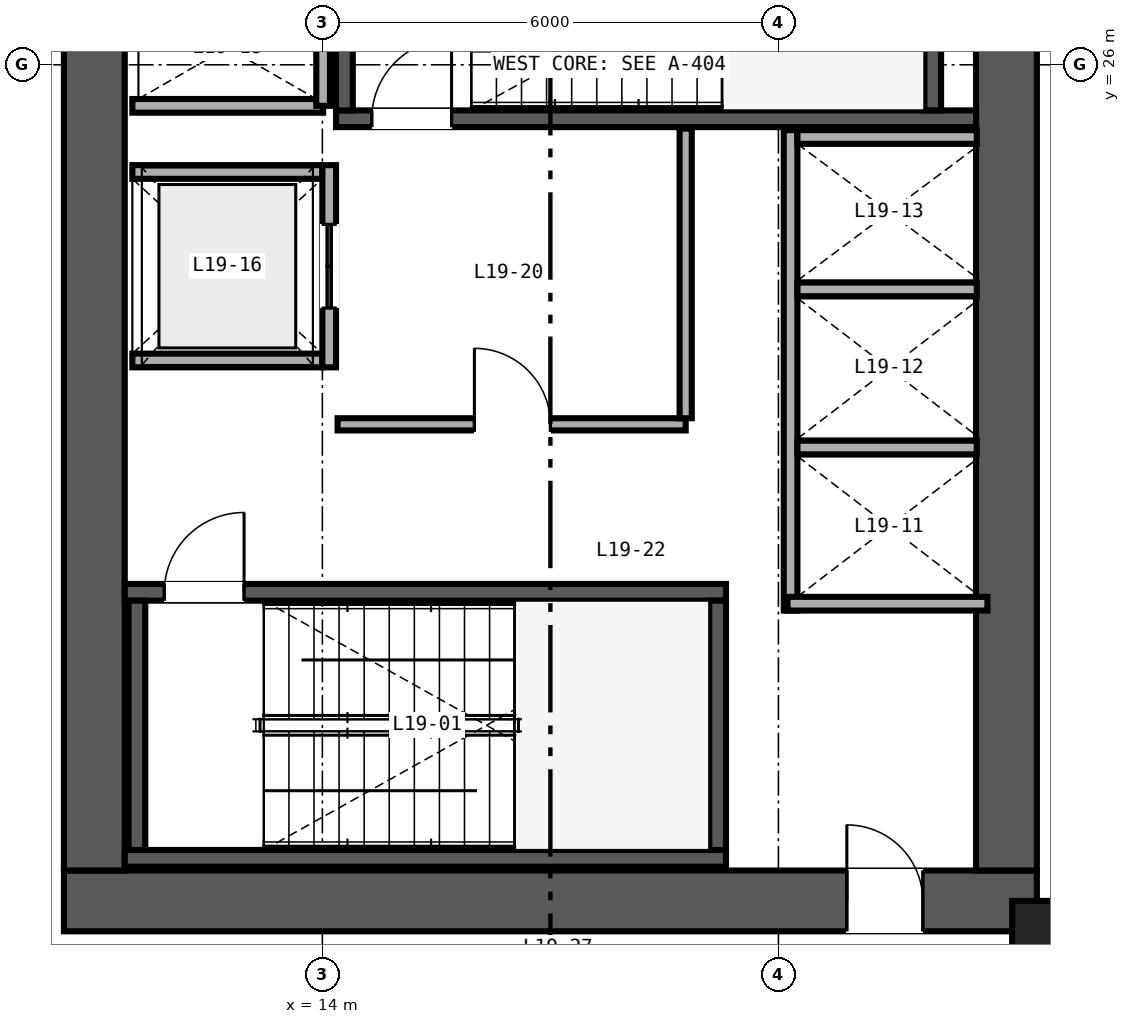
"""IFC4 building model, lengths in metres.
Left out: names, types, materials, properties, quantities, classifications, styles, units other than length and angle.
Written with IfcOpenShell. Run it as: python <this file> out.ifc"""

import sys

from ifc_helpers import new_model, si_unit, direction, frame, frame_2d, origin, origin_2d, place, context, subcontext, project, spatial, rectangle, hollow_rectangle, extrude, source, transform, mapped, element, fill, save


model = new_model("IFC4")
c1 = context("Model", 3, precision=1e-05, world=origin(), true_north=direction((0.0, 1.0)))
c2 = subcontext(c1, "Body", "Model", "MODEL_VIEW")
j1 = project(units=[si_unit("LENGTHUNIT", "METRE"), si_unit("PLANEANGLEUNIT", "RADIAN")], contexts=[c1])
p1 = place(None, origin())
s1 = spatial("IfcSite", under=j1, at=p1, CompositionType="ELEMENT")
p2 = place(p1, origin())
s2 = spatial("IfcBuilding", under=s1, at=p2, CompositionType="ELEMENT")
p3 = place(p2, frame((0.0, 0.0, 78.0)))
s3 = spatial("IfcBuildingStorey", under=s2, at=p3, CompositionType="ELEMENT", Elevation=78.0)
p4 = place(p3, frame((10.6, 15.0, 0.0), z_axis=(0.0, 0.0, 1.0), x_axis=(1.0, 0.0, 0.0)))
e1 = element("IfcWall", 1, at=p4, inside=s3, PredefinedType="SHEAR", context=c2, shape_type="SweptSolid", body=[
    extrude(rectangle(XDim=12.8, YDim=0.8, at=frame_2d((6.4, 0.0))), origin(), (0.0, 0.0, 1.0), 3.35),
])
p5 = place(p4, frame((10.3, 0.0, 0.0)))
e2 = element("IfcOpeningElement", 2, at=p5, cuts=e1, PredefinedType="OPENING", context=c2, shape_type="SweptSolid", body=[
    extrude(rectangle(XDim=1.0, YDim=2.15, at=frame_2d((0.5, 1.075))), frame((0.0, 0.41, 0.0), z_axis=(0.0, -1.0, 0.0), x_axis=(1.0, 0.0, 0.0)), (0.0, 0.0, 1.0), 0.82),
])
for number, where, z_axis, x_axis in (
    (3, (11.0, 15.4, 0.0), (0.0, 0.0, 1.0), (0.0, 1.0, 0.0)),
    (4, (23.0, 15.4, 0.0), (0.0, 0.0, 1.0), (0.0, 1.0, 0.0)),
):
    element("IfcWall", number, at=place(p3, frame(where, z_axis=z_axis, x_axis=x_axis)), inside=s3, PredefinedType="SHEAR", context=c2, shape_type="SweptSolid", body=[
        extrude(rectangle(XDim=21.2, YDim=0.8, at=frame_2d((10.6, 0.0))), origin(), (0.0, 0.0, 1.0), 3.35),
    ])
p6 = place(p3, frame((11.4, 15.56, 0.0), z_axis=(0.0, 0.0, 1.0), x_axis=(1.0, 0.0, 0.0)))
e5 = element("IfcWall", 5, at=p6, inside=s3, PredefinedType="SHEAR", context=c2, shape_type="SweptSolid", body=[
    extrude(rectangle(XDim=7.91, YDim=0.22, at=frame_2d((3.955, 0.0))), origin(), (0.0, 0.0, 1.0), 3.4),
])
p7 = place(p3, frame((11.4, 19.06, 0.0), z_axis=(0.0, 0.0, 1.0), x_axis=(1.0, 0.0, 0.0)))
e6 = element("IfcWall", 6, at=p7, inside=s3, PredefinedType="SHEAR", context=c2, shape_type="SweptSolid", body=[
    extrude(rectangle(XDim=7.91, YDim=0.22, at=frame_2d((3.955, 0.0))), origin(), (0.0, 0.0, 1.0), 3.4),
])
p8 = place(p7, frame((0.52, 0.0, 0.0)))
e7 = element("IfcOpeningElement", 7, at=p8, cuts=e6, PredefinedType="OPENING", context=c2, shape_type="SweptSolid", body=[
    extrude(rectangle(XDim=1.05, YDim=2.15, at=frame_2d((0.525, 1.075))), frame((0.0, 0.12, 0.0), z_axis=(0.0, -1.0, 0.0), x_axis=(1.0, 0.0, 0.0)), (0.0, 0.0, 1.0), 0.24),
])
for number, where, z_axis, x_axis in (
    (8, (11.56, 15.67, 0.0), (0.0, 0.0, 1.0), (0.0, 1.0, 0.0)),
    (9, (19.2, 15.67, 0.0), (0.0, 0.0, 1.0), (0.0, 1.0, 0.0)),
):
    element("IfcWall", number, at=place(p3, frame(where, z_axis=z_axis, x_axis=x_axis)), inside=s3, PredefinedType="SHEAR", context=c2, shape_type="SweptSolid", body=[
        extrude(rectangle(XDim=3.28, YDim=0.22, at=frame_2d((1.64, 0.0))), origin(), (0.0, 0.0, 1.0), 3.4),
    ])
p9 = place(p3, frame((14.18, 25.29, 0.0), z_axis=(0.0, 0.0, 1.0), x_axis=(1.0, 0.0, 0.0)))
e10 = element("IfcWall", 10, at=p9, inside=s3, PredefinedType="SHEAR", context=c2, shape_type="SweptSolid", body=[
    extrude(rectangle(XDim=8.42, YDim=0.22, at=frame_2d((4.21, 0.0))), origin(), (0.0, 0.0, 1.0), 3.4),
])
p10 = place(p9, frame((0.47, 0.0, 0.0)))
e11 = element("IfcOpeningElement", 11, at=p10, cuts=e10, PredefinedType="OPENING", context=c2, shape_type="SweptSolid", body=[
    extrude(rectangle(XDim=1.05, YDim=2.15, at=frame_2d((0.525, 1.075))), frame((0.0, 0.12, 0.0), z_axis=(0.0, -1.0, 0.0), x_axis=(1.0, 0.0, 0.0)), (0.0, 0.0, 1.0), 0.24),
])
for number, where, z_axis, x_axis in (
    (12, (14.29, 25.4, 0.0), (0.0, 0.0, 1.0), (0.0, 1.0, 0.0)),
    (13, (22.03, 25.4, 0.0), (0.0, 0.0, 1.0), (0.0, 1.0, 0.0)),
):
    element("IfcWall", number, at=place(p3, frame(where, z_axis=z_axis, x_axis=x_axis)), inside=s3, PredefinedType="SHEAR", context=c2, shape_type="SweptSolid", body=[
        extrude(rectangle(XDim=3.28, YDim=0.22, at=frame_2d((1.64, 0.0))), origin(), (0.0, 0.0, 1.0), 3.4),
    ])
m1 = source(origin(), c2, "Body", "SweptSolid", [
    extrude(hollow_rectangle(XDim=0.85, YDim=0.9, WallThickness=0.04, at=origin_2d()), origin(), (0.0, 0.0, 1.0), 3.35),
])
p11 = place(p3, frame((23.5, 14.55, 0.0), z_axis=(0.0, 0.0, 1.0), x_axis=(1.0, 0.0, 0.0)))
e14 = element("IfcColumn", 14, at=p11, inside=s3, PredefinedType="COLUMN", context=c2, shape_type="MappedRepresentation", body=[
    mapped(m1, transform((0.0, 0.0, 0.0), scale=1.0)),
])
p12 = place(p3, frame((20.16, 18.82, 0.0), z_axis=(0.0, 0.0, 1.0), x_axis=(0.0, 1.0, 0.0)))
e15 = element("IfcWall", 15, at=p12, inside=s3, PredefinedType="SOLIDWALL", context=c2, shape_type="SweptSolid", body=[
    extrude(rectangle(XDim=6.32, YDim=0.18, at=frame_2d((3.16, 0.0))), origin(), (0.0, 0.0, 1.0), 2.36),
])
p13 = place(p3, frame((20.12, 18.91, 0.0), z_axis=(0.0, 0.0, 1.0), x_axis=(1.0, 0.0, 0.0)))
e16 = element("IfcWall", 16, at=p13, inside=s3, PredefinedType="SOLIDWALL", context=c2, shape_type="SweptSolid", body=[
    extrude(rectangle(XDim=2.63, YDim=0.18, at=frame_2d((1.315, 0.0))), origin(), (0.0, 0.0, 1.0), 3.35),
])
p14 = place(p3, frame((20.25, 25.05, 0.0), z_axis=(0.0, 0.0, 1.0), x_axis=(1.0, 0.0, 0.0)))
e17 = element("IfcWall", 17, at=p14, inside=s3, PredefinedType="SOLIDWALL", context=c2, shape_type="SweptSolid", body=[
    extrude(rectangle(XDim=2.36, YDim=0.18, at=frame_2d((1.18, 0.0))), origin(), (0.0, 0.0, 1.0), 3.35),
])
p15 = place(p3, frame((20.25, 20.965, 0.0), z_axis=(0.0, 0.0, 1.0), x_axis=(1.0, 0.0, 0.0)))
e18 = element("IfcWall", 18, at=p15, inside=s3, PredefinedType="SOLIDWALL", context=c2, shape_type="SweptSolid", body=[
    extrude(rectangle(XDim=2.36, YDim=0.18, at=frame_2d((1.18, 0.0))), origin(), (0.0, 0.0, 1.0), 2.36),
])
p16 = place(p3, frame((20.25, 23.045, 0.0), z_axis=(0.0, 0.0, 1.0), x_axis=(1.0, 0.0, 0.0)))
e19 = element("IfcWall", 19, at=p16, inside=s3, PredefinedType="SOLIDWALL", context=c2, shape_type="SweptSolid", body=[
    extrude(rectangle(XDim=2.36, YDim=0.18, at=frame_2d((1.18, 0.0))), origin(), (0.0, 0.0, 1.0), 3.35),
])
for number, where, z_axis, x_axis in (
    (20, (11.5, 22.11, 0.0), (0.0, 0.0, 1.0), (1.0, 0.0, 0.0)),
    (21, (11.5, 24.59, 0.0), (0.0, 0.0, 1.0), (1.0, 0.0, 0.0)),
):
    element("IfcWall", number, at=place(p3, frame(where, z_axis=z_axis, x_axis=x_axis)), inside=s3, PredefinedType="SOLIDWALL", context=c2, shape_type="SweptSolid", body=[
        extrude(rectangle(XDim=2.5, YDim=0.18, at=frame_2d((1.25, 0.0))), origin(), (0.0, 0.0, 1.0), 3.35),
    ])
p17 = place(p3, frame((14.09, 22.02, 0.0), z_axis=(0.0, 0.0, 1.0), x_axis=(0.0, 1.0, 0.0)))
e22 = element("IfcWall", 22, at=p17, inside=s3, PredefinedType="SOLIDWALL", context=c2, shape_type="SweptSolid", body=[
    extrude(rectangle(XDim=2.66, YDim=0.18, at=frame_2d((1.33, 0.0))), origin(), (0.0, 0.0, 1.0), 3.35),
])
p18 = place(p17, frame((0.78, 0.0, 0.0)))
e23 = element("IfcOpeningElement", 23, at=p18, cuts=e22, PredefinedType="OPENING", context=c2, shape_type="SweptSolid", body=[
    extrude(rectangle(XDim=1.1, YDim=2.2, at=frame_2d((0.55, 1.1))), frame((0.0, 0.1, 0.0), z_axis=(0.0, -1.0, 0.0), x_axis=(1.0, 0.0, 0.0)), (0.0, 0.0, 1.0), 0.2),
])
p19 = place(p3, frame((11.5, 25.46, 0.0), z_axis=(0.0, 0.0, 1.0), x_axis=(1.0, 0.0, 0.0)))
e24 = element("IfcWall", 24, at=p19, inside=s3, PredefinedType="SOLIDWALL", context=c2, shape_type="SweptSolid", body=[
    extrude(rectangle(XDim=2.51, YDim=0.18, at=frame_2d((1.255, 0.0))), origin(), (0.0, 0.0, 1.0), 3.35),
])
p20 = place(p3, frame((14.01, 25.46, 0.0), z_axis=(0.0, 0.0, 1.0), x_axis=(0.0, 1.0, 0.0)))
e25 = element("IfcWall", 25, at=p20, inside=s3, PredefinedType="SOLIDWALL", context=c2, shape_type="SweptSolid", body=[
    extrude(rectangle(XDim=3.08, YDim=0.18, at=frame_2d((1.54, 0.0))), origin(), (0.0, 0.0, 1.0), 3.35),
])
p21 = place(p3, frame((14.2, 21.27, 0.0), z_axis=(0.0, 0.0, 1.0), x_axis=(1.0, 0.0, 0.0)))
e26 = element("IfcWall", 26, at=p21, inside=s3, PredefinedType="PARTITIONING", context=c2, shape_type="SweptSolid", body=[
    extrude(rectangle(XDim=4.58, YDim=0.16, at=frame_2d((2.29, 0.0))), origin(), (0.0, 0.0, 1.0), 3.35),
])
p22 = place(p21, frame((1.8, 0.0, 0.0)))
e27 = element("IfcOpeningElement", 27, at=p22, cuts=e26, PredefinedType="OPENING", context=c2, shape_type="SweptSolid", body=[
    extrude(rectangle(XDim=1.0, YDim=2.15, at=frame_2d((0.5, 1.075))), frame((0.0, 0.09, 0.0), z_axis=(0.0, -1.0, 0.0), x_axis=(1.0, 0.0, 0.0)), (0.0, 0.0, 1.0), 0.18),
])
p23 = place(p3, frame((18.78, 21.35, 0.0), z_axis=(0.0, 0.0, 1.0), x_axis=(0.0, 1.0, 0.0)))
e28 = element("IfcWall", 28, at=p23, inside=s3, PredefinedType="PARTITIONING", context=c2, shape_type="SweptSolid", body=[
    extrude(rectangle(XDim=3.81, YDim=0.16, at=frame_2d((1.905, 0.0))), origin(), (0.0, 0.0, 1.0), 3.35),
])
m2 = source(origin(), c2, "Body", "SweptSolid", [
    extrude(rectangle(XDim=1.05, YDim=2.15, at=frame_2d((0.525, 1.075))), frame((0.0, 0.025, 0.0), z_axis=(0.0, -1.0, 0.0), x_axis=(1.0, 0.0, 0.0)), (0.0, 0.0, 1.0), 0.05),
])
p24 = place(p8, origin())
e29 = element("IfcDoor", 29, at=p24, inside=s3, OperationType="SINGLE_SWING_RIGHT", PredefinedType="DOOR", context=c2, shape_type="MappedRepresentation", body=[
    mapped(m2, transform((0.0, 0.0, 0.0), scale=1.0)),
])
fill(e7, e29)
p25 = place(p10, origin())
e30 = element("IfcDoor", 30, at=p25, inside=s3, OperationType="SINGLE_SWING_RIGHT", PredefinedType="DOOR", context=c2, shape_type="MappedRepresentation", body=[
    mapped(m2, transform((0.0, 0.0, 0.0), scale=1.0)),
])
fill(e11, e30)
m3 = source(origin(), c2, "Body", "SweptSolid", [
    extrude(rectangle(XDim=1.1, YDim=2.2, at=frame_2d((0.55, 1.1))), frame((0.0, 0.025, 0.0), z_axis=(0.0, -1.0, 0.0), x_axis=(1.0, 0.0, 0.0)), (0.0, 0.0, 1.0), 0.05),
])
p26 = place(p18, origin())
e31 = element("IfcDoor", 31, at=p26, inside=s3, OperationType="DOUBLE_DOOR_SLIDING", PredefinedType="DOOR", context=c2, shape_type="MappedRepresentation", body=[
    mapped(m3, transform((0.0, 0.0, 0.0), scale=1.0)),
])
fill(e23, e31)
m4 = source(origin(), c2, "Body", "SweptSolid", [
    extrude(rectangle(XDim=1.0, YDim=2.15, at=frame_2d((0.5, 1.075))), frame((0.0, 0.025, 0.0), z_axis=(0.0, -1.0, 0.0), x_axis=(1.0, 0.0, 0.0)), (0.0, 0.0, 1.0), 0.05),
])
p27 = place(p22, origin())
e32 = element("IfcDoor", 32, at=p27, inside=s3, OperationType="SINGLE_SWING_LEFT", PredefinedType="DOOR", context=c2, shape_type="MappedRepresentation", body=[
    mapped(m4, transform((0.0, 0.0, 0.0), scale=1.0)),
])
fill(e27, e32)
p28 = place(p5, origin())
e33 = element("IfcDoor", 33, at=p28, inside=s3, OperationType="SINGLE_SWING_LEFT", PredefinedType="DOOR", context=c2, shape_type="MappedRepresentation", body=[
    mapped(m4, transform((0.0, 0.0, 0.0), scale=1.0)),
])
fill(e2, e33)
save(model, sys.argv[1])
